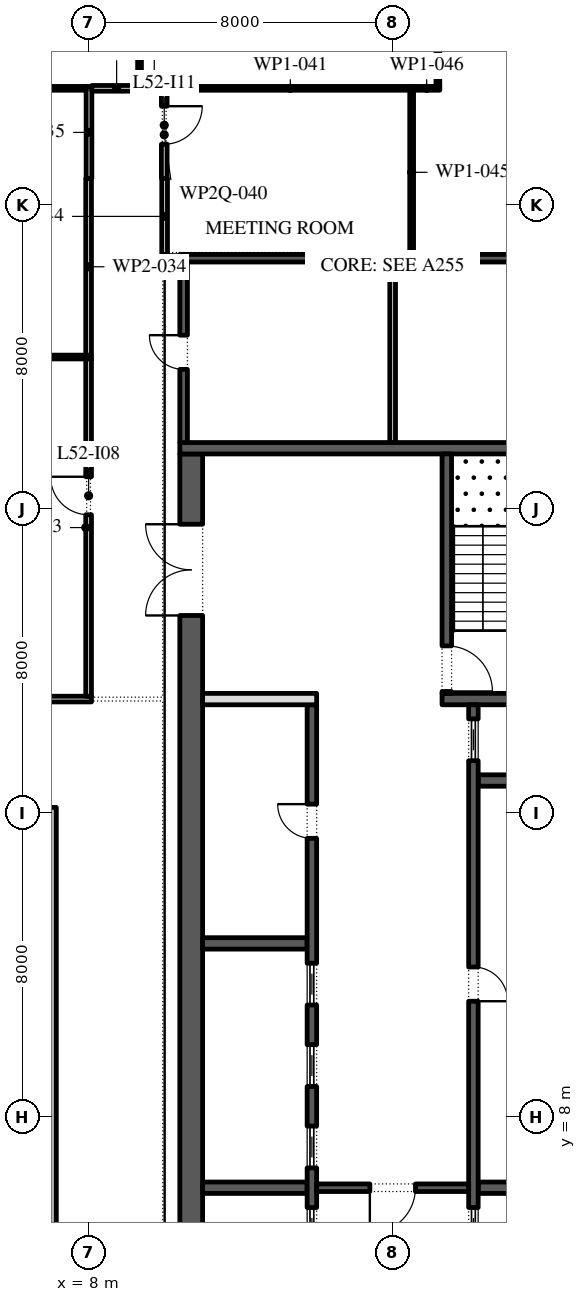
"""IFC4 building model, lengths in metres.
Left out: names, types, materials, properties, quantities, classifications, styles, units other than length and angle.
Written with IfcOpenShell. Run it as: python <this file> out.ifc"""

import sys

from ifc_helpers import new_model, si_unit, direction, frame, frame_2d, origin, place, context, subcontext, project, spatial, polyline, rectangle, outline, extrude, element, fill, save


model = new_model("IFC4")
c1 = context("Model", 3, precision=1e-05, world=origin(), true_north=direction((0.0, 1.0)))
c2 = subcontext(c1, "Body", "Model", "MODEL_VIEW")
j1 = project(units=[si_unit("LENGTHUNIT", "METRE"), si_unit("PLANEANGLEUNIT", "RADIAN")], contexts=[c1])
p1 = place(None, origin())
s1 = spatial("IfcSite", under=j1, at=p1, CompositionType="ELEMENT")
p2 = place(p1, origin())
s2 = spatial("IfcBuilding", under=s1, at=p2, CompositionType="ELEMENT")
p3 = place(p2, frame((0.0, 0.0, 243.0)))
s3 = spatial("IfcBuildingStorey", under=s2, at=p3, CompositionType="ELEMENT", Elevation=243.0)
p4 = place(p3, origin())
e1 = element("IfcWall", 1, at=p4, inside=s3, PredefinedType="STANDARD", context=c2, shape_type="SweptSolid", body=[
    extrude(outline(polyline([(-7.15, -2.15), (7.15, -2.15), (7.15, 16.15), (-7.15, 16.15), (-7.15, -2.15)]), holes=[polyline([(-7.0, -2.0), (-7.0, 16.0), (7.0, 16.0), (7.0, -2.0), (-7.0, -2.0)])]), origin(), (0.0, 0.0, 1.0), 4.0),
])
p5 = place(p3, frame((10.7, -2.45, 0.0), z_axis=(0.0, 0.0, 1.0), x_axis=(0.0, 1.0, 0.0)))
e2 = element("IfcWall", 2, at=p5, inside=s3, PredefinedType="SHEAR", context=c2, shape_type="SweptSolid", body=[
    extrude(rectangle(XDim=27.9, YDim=0.6, at=frame_2d((13.95, 0.0))), origin(), (0.0, 0.0, 1.0), 4.0),
])
p6 = place(p5, frame((23.65, 0.0, 0.0)))
e3 = element("IfcOpeningElement", 3, at=p6, cuts=e2, PredefinedType="OPENING", context=c2, shape_type="SweptSolid", body=[
    extrude(rectangle(XDim=2.4, YDim=2.1, at=frame_2d((1.2, 1.05))), frame((0.0, 0.31, 0.0), z_axis=(0.0, -1.0, 0.0), x_axis=(1.0, 0.0, 0.0)), (0.0, 0.0, 1.0), 0.62),
])
p7 = place(p5, frame((1.087, 0.0, 0.0)))
e4 = element("IfcOpeningElement", 4, at=p7, cuts=e2, PredefinedType="OPENING", context=c2, shape_type="SweptSolid", body=[
    extrude(rectangle(XDim=0.9, YDim=2.1, at=frame_2d((0.45, 1.05))), frame((0.0, 0.31, 0.0), z_axis=(0.0, -1.0, 0.0), x_axis=(1.0, 0.0, 0.0)), (0.0, 0.0, 1.0), 0.62),
])
p8 = place(p5, frame((4.262, 0.0, 0.0)))
e5 = element("IfcOpeningElement", 5, at=p8, cuts=e2, PredefinedType="OPENING", context=c2, shape_type="SweptSolid", body=[
    extrude(rectangle(XDim=1.0, YDim=2.1, at=frame_2d((0.5, 1.05))), frame((0.0, 0.31, 0.0), z_axis=(0.0, -1.0, 0.0), x_axis=(1.0, 0.0, 0.0)), (0.0, 0.0, 1.0), 0.62),
])
p9 = place(p3, frame((10.4, 25.6, 0.0), z_axis=(0.0, 0.0, 1.0), x_axis=(1.0, 0.0, 0.0)))
e6 = element("IfcWall", 6, at=p9, inside=s3, PredefinedType="SHEAR", context=c2, shape_type="SweptSolid", body=[
    extrude(rectangle(XDim=11.2, YDim=0.3, at=frame_2d((5.6, 0.0))), origin(), (0.0, 0.0, 1.0), 4.0),
])
p10 = place(p3, frame((17.3, 19.0, 0.0), z_axis=(0.0, 0.0, 1.0), x_axis=(1.0, 0.0, 0.0)))
e7 = element("IfcWall", 7, at=p10, inside=s3, PredefinedType="SHEAR", context=c2, shape_type="SweptSolid", body=[
    extrude(rectangle(XDim=3.7, YDim=0.3, at=frame_2d((1.85, 0.0))), origin(), (0.0, 0.0, 1.0), 4.0),
])
p11 = place(p3, frame((17.425, 19.15, 0.0), z_axis=(0.0, 0.0, 1.0), x_axis=(0.0, 1.0, 0.0)))
e8 = element("IfcWall", 8, at=p11, inside=s3, PredefinedType="SHEAR", context=c2, shape_type="SweptSolid", body=[
    extrude(rectangle(XDim=6.3, YDim=0.25, at=frame_2d((3.15, 0.0))), origin(), (0.0, 0.0, 1.0), 4.0),
])
p12 = place(p11, frame((0.05, 0.0, 0.0)))
e9 = element("IfcOpeningElement", 9, at=p12, cuts=e8, PredefinedType="OPENING", context=c2, shape_type="SweptSolid", body=[
    extrude(rectangle(XDim=1.2, YDim=2.1, at=frame_2d((0.6, 1.05))), frame((0.0, 0.135, 0.0), z_axis=(0.0, -1.0, 0.0), x_axis=(1.0, 0.0, 0.0)), (0.0, 0.0, 1.0), 0.27),
])
for number, where, z_axis, x_axis in (
    (10, (18.25, 6.143, 0.0), (0.0, 0.0, 1.0), (1.0, 0.0, 0.0)),
    (11, (18.25, 16.857, 0.0), (0.0, 0.0, 1.0), (1.0, 0.0, 0.0)),
):
    element("IfcWall", number, at=place(p3, frame(where, z_axis=z_axis, x_axis=x_axis)), inside=s3, PredefinedType="SHEAR", context=c2, shape_type="SweptSolid", body=[
        extrude(rectangle(XDim=2.75, YDim=0.3, at=frame_2d((1.375, 0.0))), origin(), (0.0, 0.0, 1.0), 4.0),
    ])
p13 = place(p3, frame((18.125, 4.15, 0.0), z_axis=(0.0, 0.0, 1.0), x_axis=(0.0, 1.0, 0.0)))
e12 = element("IfcWall", 12, at=p13, inside=s3, PredefinedType="SHEAR", context=c2, shape_type="SweptSolid", body=[
    extrude(rectangle(XDim=14.7, YDim=0.25, at=frame_2d((7.35, 0.0))), origin(), (0.0, 0.0, 1.0), 4.0),
])
p14 = place(p13, frame((6.9, 0.0, 0.0)))
e13 = element("IfcOpeningElement", 13, at=p14, cuts=e12, PredefinedType="OPENING", context=c2, shape_type="SweptSolid", body=[
    extrude(rectangle(XDim=0.9, YDim=2.1, at=frame_2d((0.45, 1.05))), frame((0.0, 0.135, 0.0), z_axis=(0.0, -1.0, 0.0), x_axis=(1.0, 0.0, 0.0)), (0.0, 0.0, 1.0), 0.27),
])
p15 = place(p13, frame((0.371, 0.0, 0.0)))
e14 = element("IfcOpeningElement", 14, at=p15, cuts=e12, PredefinedType="OPENING", context=c2, shape_type="SweptSolid", body=[
    extrude(rectangle(XDim=1.1, YDim=2.1, at=frame_2d((0.55, 1.05))), frame((0.0, 0.135, 0.0), z_axis=(0.0, -1.0, 0.0), x_axis=(1.0, 0.0, 0.0)), (0.0, 0.0, 1.0), 0.27),
])
p16 = place(p13, frame((13.229, 0.0, 0.0)))
e15 = element("IfcOpeningElement", 15, at=p16, cuts=e12, PredefinedType="OPENING", context=c2, shape_type="SweptSolid", body=[
    extrude(rectangle(XDim=1.1, YDim=2.1, at=frame_2d((0.55, 1.05))), frame((0.0, 0.135, 0.0), z_axis=(0.0, -1.0, 0.0), x_axis=(1.0, 0.0, 0.0)), (0.0, 0.0, 1.0), 0.27),
])
for number, where, z_axis, x_axis in (
    (16, (11.0, 6.143, 0.0), (0.0, 0.0, 1.0), (1.0, 0.0, 0.0)),
    (17, (11.0, 12.571, 0.0), (0.0, 0.0, 1.0), (1.0, 0.0, 0.0)),
):
    element("IfcWall", number, at=place(p3, frame(where, z_axis=z_axis, x_axis=x_axis)), inside=s3, PredefinedType="SHEAR", context=c2, shape_type="SweptSolid", body=[
        extrude(rectangle(XDim=2.75, YDim=0.3, at=frame_2d((1.375, 0.0))), origin(), (0.0, 0.0, 1.0), 4.0),
    ])
p17 = place(p3, frame((13.875, -2.45, 0.0), z_axis=(0.0, 0.0, 1.0), x_axis=(0.0, 1.0, 0.0)))
e18 = element("IfcWall", 18, at=p17, inside=s3, PredefinedType="SHEAR", context=c2, shape_type="SweptSolid", body=[
    extrude(rectangle(XDim=21.3, YDim=0.25, at=frame_2d((10.65, 0.0))), origin(), (0.0, 0.0, 1.0), 4.0),
])
p18 = place(p17, frame((17.786, 0.0, 0.0)))
e19 = element("IfcOpeningElement", 19, at=p18, cuts=e18, PredefinedType="OPENING", context=c2, shape_type="SweptSolid", body=[
    extrude(rectangle(XDim=0.9, YDim=2.1, at=frame_2d((0.45, 1.05))), frame((0.0, 0.135, 0.0), z_axis=(0.0, -1.0, 0.0), x_axis=(1.0, 0.0, 0.0)), (0.0, 0.0, 1.0), 0.27),
])
p19 = place(p17, frame((6.971, 0.0, 0.0)))
e20 = element("IfcOpeningElement", 20, at=p19, cuts=e18, PredefinedType="OPENING", context=c2, shape_type="SweptSolid", body=[
    extrude(rectangle(XDim=1.1, YDim=2.1, at=frame_2d((0.55, 1.05))), frame((0.0, 0.135, 0.0), z_axis=(0.0, -1.0, 0.0), x_axis=(1.0, 0.0, 0.0)), (0.0, 0.0, 1.0), 0.27),
])
p20 = place(p17, frame((9.114, 0.0, 0.0)))
e21 = element("IfcOpeningElement", 21, at=p20, cuts=e18, PredefinedType="OPENING", context=c2, shape_type="SweptSolid", body=[
    extrude(rectangle(XDim=1.1, YDim=2.1, at=frame_2d((0.55, 1.05))), frame((0.0, 0.135, 0.0), z_axis=(0.0, -1.0, 0.0), x_axis=(1.0, 0.0, 0.0)), (0.0, 0.0, 1.0), 0.27),
])
p21 = place(p17, frame((11.257, 0.0, 0.0)))
e22 = element("IfcOpeningElement", 22, at=p21, cuts=e18, PredefinedType="OPENING", context=c2, shape_type="SweptSolid", body=[
    extrude(rectangle(XDim=1.1, YDim=2.1, at=frame_2d((0.55, 1.05))), frame((0.0, 0.135, 0.0), z_axis=(0.0, -1.0, 0.0), x_axis=(1.0, 0.0, 0.0)), (0.0, 0.0, 1.0), 0.27),
])
p22 = place(p17, frame((13.4, 0.0, 0.0)))
e23 = element("IfcOpeningElement", 23, at=p22, cuts=e18, PredefinedType="OPENING", context=c2, shape_type="SweptSolid", body=[
    extrude(rectangle(XDim=1.1, YDim=2.1, at=frame_2d((0.55, 1.05))), frame((0.0, 0.135, 0.0), z_axis=(0.0, -1.0, 0.0), x_axis=(1.0, 0.0, 0.0)), (0.0, 0.0, 1.0), 0.27),
])
p23 = place(p3, frame((11.0, 19.0, 0.0), z_axis=(0.0, 0.0, 1.0), x_axis=(1.0, 0.0, 0.0)))
e24 = element("IfcWall", 24, at=p23, inside=s3, PredefinedType="PARTITIONING", context=c2, shape_type="SweptSolid", body=[
    extrude(rectangle(XDim=3.0, YDim=0.3, at=frame_2d((1.5, 0.0))), origin(), (0.0, 0.0, 1.0), 4.0),
])
p24 = place(p3, frame((14.0, 6.143, 0.0), z_axis=(0.0, 0.0, 1.0), x_axis=(1.0, 0.0, 0.0)))
e25 = element("IfcWall", 25, at=p24, inside=s3, PredefinedType="SHEAR", context=c2, shape_type="SweptSolid", body=[
    extrude(rectangle(XDim=4.0, YDim=0.2, at=frame_2d((2.0, 0.0))), origin(), (0.0, 0.0, 1.0), 4.0),
])
p25 = place(p24, frame((1.4, 0.0, 0.0)))
e26 = element("IfcOpeningElement", 26, at=p25, cuts=e25, PredefinedType="OPENING", context=c2, shape_type="SweptSolid", body=[
    extrude(rectangle(XDim=1.2, YDim=2.1, at=frame_2d((0.6, 1.05))), frame((0.0, 0.11, 0.0), z_axis=(0.0, -1.0, 0.0), x_axis=(1.0, 0.0, 0.0)), (0.0, 0.0, 1.0), 0.22),
])
p26 = place(p3, frame((10.5, 25.75, 0.0), z_axis=(0.0, 0.0, 1.0), x_axis=(0.0, 1.0, 0.0)))
e27 = element("IfcWall", 27, at=p26, inside=s3, PredefinedType="SHEAR", context=c2, shape_type="SweptSolid", body=[
    extrude(rectangle(XDim=4.75, YDim=0.2, at=frame_2d((2.375, 0.0))), origin(), (0.0, 0.0, 1.0), 4.0),
])
p27 = place(p26, frame((1.925, 0.0, 0.0)))
e28 = element("IfcOpeningElement", 28, at=p27, cuts=e27, PredefinedType="OPENING", context=c2, shape_type="SweptSolid", body=[
    extrude(rectangle(XDim=0.9, YDim=2.1, at=frame_2d((0.45, 1.05))), frame((0.0, 0.11, 0.0), z_axis=(0.0, -1.0, 0.0), x_axis=(1.0, 0.0, 0.0)), (0.0, 0.0, 1.0), 0.22),
])
p28 = place(p3, frame((10.4, 30.6, 0.0), z_axis=(0.0, 0.0, 1.0), x_axis=(1.0, 0.0, 0.0)))
e29 = element("IfcWall", 29, at=p28, inside=s3, PredefinedType="SHEAR", context=c2, shape_type="SweptSolid", body=[
    extrude(rectangle(XDim=11.2, YDim=0.2, at=frame_2d((5.6, 0.0))), origin(), (0.0, 0.0, 1.0), 4.0),
])
p29 = place(p3, frame((16.0, 25.75, 0.0), z_axis=(0.0, 0.0, 1.0), x_axis=(0.0, 1.0, 0.0)))
e30 = element("IfcWall", 30, at=p29, inside=s3, PredefinedType="PARTITIONING", context=c2, shape_type="SweptSolid", body=[
    extrude(rectangle(XDim=4.75, YDim=0.15, at=frame_2d((2.375, 0.0))), origin(), (0.0, 0.0, 1.0), 4.0),
])
p30 = place(p3, frame((1.025, 19.0, 0.0), z_axis=(0.0, 0.0, 1.0), x_axis=(1.0, 0.0, 0.0)))
e31 = element("IfcWall", 31, at=p30, inside=s3, PredefinedType="PARTITIONING", context=c2, shape_type="SweptSolid", body=[
    extrude(rectangle(XDim=7.05, YDim=0.15, at=frame_2d((3.525, 0.0))), origin(), (0.0, 0.0, 1.0), 4.0),
])
p31 = place(p3, frame((1.175, 28.0, 0.0), z_axis=(0.0, 0.0, 1.0), x_axis=(1.0, 0.0, 0.0)))
e32 = element("IfcWall", 32, at=p31, inside=s3, PredefinedType="PARTITIONING", context=c2, shape_type="SweptSolid", body=[
    extrude(rectangle(XDim=6.9, YDim=0.1, at=frame_2d((3.45, 0.0))), origin(), (0.0, 0.0, 1.0), 4.0),
])
p32 = place(p3, frame((8.0, 19.075, 0.0), z_axis=(0.0, 0.0, 1.0), x_axis=(0.0, 1.0, 0.0)))
e33 = element("IfcWall", 33, at=p32, inside=s3, PredefinedType="PARTITIONING", context=c2, shape_type="SweptSolid", body=[
    extrude(rectangle(XDim=8.875, YDim=0.15, at=frame_2d((4.438, 0.0))), origin(), (0.0, 0.0, 1.0), 4.0),
])
p33 = place(p32, frame((4.775, 0.0, 0.0)))
e34 = element("IfcOpeningElement", 34, at=p33, cuts=e33, PredefinedType="OPENING", context=c2, shape_type="SweptSolid", body=[
    extrude(rectangle(XDim=1.0, YDim=2.1, at=frame_2d((0.5, 1.05))), frame((0.0, 0.085, 0.0), z_axis=(0.0, -1.0, 0.0), x_axis=(1.0, 0.0, 0.0)), (0.0, 0.0, 1.0), 0.17),
])
p34 = place(p3, frame((8.0, 28.05, 0.0), z_axis=(0.0, 0.0, 1.0), x_axis=(0.0, 1.0, 0.0)))
e35 = element("IfcWall", 35, at=p34, inside=s3, PredefinedType="PARTITIONING", context=c2, shape_type="SweptSolid", body=[
    extrude(rectangle(XDim=4.65, YDim=0.15, at=frame_2d((2.325, 0.0))), origin(), (0.0, 0.0, 1.0), 4.0),
])
p35 = place(p3, frame((8.01, 32.7, 0.0), z_axis=(0.0, 0.0, 1.0), x_axis=(0.0, 1.0, 0.0)))
e36 = element("IfcWall", 36, at=p35, inside=s3, PredefinedType="PARTITIONING", context=c2, shape_type="SweptSolid", body=[
    extrude(rectangle(XDim=2.42, YDim=0.15, at=frame_2d((1.21, 0.0))), origin(), (0.0, 0.0, 1.0), 4.0),
])
p36 = place(p3, frame((7.935, 35.07, 0.0), z_axis=(0.0, 0.0, 1.0), x_axis=(-1.0, 0.0, 0.0)))
e37 = element("IfcWall", 37, at=p36, inside=s3, PredefinedType="PARTITIONING", context=c2, shape_type="SweptSolid", body=[
    extrude(rectangle(XDim=6.76, YDim=0.1, at=frame_2d((3.38, 0.0))), origin(), (0.0, 0.0, 1.0), 4.0),
])
p37 = place(p3, frame((8.085, 35.07, 0.0), z_axis=(0.0, 0.0, 1.0), x_axis=(1.0, 0.0, 0.0)))
e38 = element("IfcWall", 38, at=p37, inside=s3, PredefinedType="PARTITIONING", context=c2, shape_type="SweptSolid", body=[
    extrude(rectangle(XDim=1.305, YDim=0.15, at=frame_2d((0.652, 0.0))), origin(), (0.0, 0.0, 1.0), 4.0),
])
p38 = place(p3, frame((9.39, 35.07, 0.0), z_axis=(0.0, 0.0, 1.0), x_axis=(1.0, 0.0, 0.0)))
e39 = element("IfcWall", 39, at=p38, inside=s3, PredefinedType="PARTITIONING", context=c2, shape_type="SweptSolid", body=[
    extrude(rectangle(XDim=0.675, YDim=0.15, at=frame_2d((0.337, 0.0))), origin(), (0.0, 0.0, 1.0), 4.0),
])
p39 = place(p3, frame((9.34, 45.368, 0.0), z_axis=(0.0, 0.0, 1.0), x_axis=(0.0, -1.0, 0.0)))
e40 = element("IfcWall", 40, at=p39, inside=s3, PredefinedType="PARTITIONING", context=c2, shape_type="SweptSolid", body=[
    extrude(rectangle(XDim=10.223, YDim=0.1, at=frame_2d((5.111, 0.0))), origin(), (0.0, 0.0, 1.0), 4.0),
])
p40 = place(p39, frame((6.698, 0.0, 0.0)))
e41 = element("IfcOpeningElement", 41, at=p40, cuts=e40, PredefinedType="OPENING", context=c2, shape_type="SweptSolid", body=[
    extrude(rectangle(XDim=0.9, YDim=2.1, at=frame_2d((0.45, 1.05))), frame((0.0, 0.06, 0.0), z_axis=(0.0, -1.0, 0.0), x_axis=(1.0, 0.0, 0.0)), (0.0, 0.0, 1.0), 0.12),
])
p41 = place(p3, frame((9.99, 34.995, 0.0), z_axis=(0.0, 0.0, 1.0), x_axis=(0.0, -1.0, 0.0)))
e42 = element("IfcWall", 42, at=p41, inside=s3, PredefinedType="PARTITIONING", context=c2, shape_type="SweptSolid", body=[
    extrude(rectangle(XDim=2.295, YDim=0.15, at=frame_2d((1.147, 0.0))), origin(), (0.0, 0.0, 1.0), 3.154),
])
p42 = place(p41, frame((0.395, 0.0, 0.0)))
e43 = element("IfcOpeningElement", 43, at=p42, cuts=e42, PredefinedType="OPENING", context=c2, shape_type="SweptSolid", body=[
    extrude(rectangle(XDim=1.0, YDim=2.1, at=frame_2d((0.5, 1.05))), frame((0.0, 0.085, 0.0), z_axis=(0.0, -1.0, 0.0), x_axis=(1.0, 0.0, 0.0)), (0.0, 0.0, 1.0), 0.17),
])
p43 = place(p3, frame((10.065, 35.07, 0.0), z_axis=(0.0, 0.0, 1.0), x_axis=(1.0, 0.0, 0.0)))
e44 = element("IfcWall", 44, at=p43, inside=s3, PredefinedType="PARTITIONING", context=c2, shape_type="SweptSolid", body=[
    extrude(rectangle(XDim=6.485, YDim=0.1, at=frame_2d((3.243, 0.0))), origin(), (0.0, 0.0, 1.0), 4.0),
])
p44 = place(p3, frame((10.0, 32.7, 0.0), z_axis=(0.0, 0.0, 1.0), x_axis=(0.0, -1.0, 0.0)))
e45 = element("IfcWall", 45, at=p44, inside=s3, PredefinedType="PARTITIONING", context=c2, shape_type="SweptSolid", body=[
    extrude(rectangle(XDim=2.0, YDim=0.15, at=frame_2d((1.0, 0.0))), origin(), (0.0, 0.0, 1.0), 3.154),
])
p45 = place(p3, frame((16.5, 35.02, 0.0), z_axis=(0.0, 0.0, 1.0), x_axis=(0.0, -1.0, 0.0)))
e46 = element("IfcWall", 46, at=p45, inside=s3, PredefinedType="PARTITIONING", context=c2, shape_type="SweptSolid", body=[
    extrude(rectangle(XDim=4.32, YDim=0.1, at=frame_2d((2.16, 0.0))), origin(), (0.0, 0.0, 1.0), 4.0),
])
p46 = place(p3, frame((17.24, 35.07, 0.0), z_axis=(0.0, 0.0, 1.0), x_axis=(-1.0, 0.0, 0.0)))
e47 = element("IfcWall", 47, at=p46, inside=s3, PredefinedType="PARTITIONING", context=c2, shape_type="SweptSolid", body=[
    extrude(rectangle(XDim=0.69, YDim=0.1, at=frame_2d((0.345, 0.0))), origin(), (0.0, 0.0, 1.0), 4.0),
])
p47 = place(p3, frame((17.19, 43.556, 0.0), z_axis=(0.0, 0.0, 1.0), x_axis=(0.0, -1.0, 0.0)))
e48 = element("IfcWall", 48, at=p47, inside=s3, PredefinedType="PARTITIONING", context=c2, shape_type="SweptSolid", body=[
    extrude(rectangle(XDim=8.436, YDim=0.1, at=frame_2d((4.218, 0.0))), origin(), (0.0, 0.0, 1.0), 4.0),
])
p48 = place(p14, frame((0.9, -0.2, 0.0), z_axis=(0.0, 0.0, 1.0), x_axis=(-1.0, 0.0, 0.0)))
e49 = element("IfcDoor", 49, at=p48, inside=s3, OperationType="SINGLE_SWING_LEFT", PredefinedType="DOOR", context=c2, shape_type="SweptSolid", body=[
    extrude(rectangle(XDim=0.9, YDim=2.1, at=frame_2d((0.45, 1.05))), frame((0.0, -0.075, 0.0), z_axis=(0.0, -1.0, 0.0), x_axis=(1.0, 0.0, 0.0)), (0.0, 0.0, 1.0), 0.05),
])
fill(e13, e49)
p49 = place(p15, origin())
e50 = element("IfcDoor", 50, at=p49, inside=s3, OperationType="SLIDING_TO_LEFT", PredefinedType="DOOR", context=c2, shape_type="SweptSolid", body=[
    extrude(rectangle(XDim=1.1, YDim=2.1, at=frame_2d((0.55, 1.05))), frame((0.0, 0.025, 0.0), z_axis=(0.0, -1.0, 0.0), x_axis=(1.0, 0.0, 0.0)), (0.0, 0.0, 1.0), 0.05),
])
fill(e14, e50)
p50 = place(p16, origin())
e51 = element("IfcDoor", 51, at=p50, inside=s3, OperationType="SLIDING_TO_LEFT", PredefinedType="DOOR", context=c2, shape_type="SweptSolid", body=[
    extrude(rectangle(XDim=1.1, YDim=2.1, at=frame_2d((0.55, 1.05))), frame((0.0, 0.025, 0.0), z_axis=(0.0, -1.0, 0.0), x_axis=(1.0, 0.0, 0.0)), (0.0, 0.0, 1.0), 0.05),
])
fill(e15, e51)
p51 = place(p18, origin())
e52 = element("IfcDoor", 52, at=p51, inside=s3, OperationType="SINGLE_SWING_LEFT", PredefinedType="DOOR", context=c2, shape_type="SweptSolid", body=[
    extrude(rectangle(XDim=0.9, YDim=2.1, at=frame_2d((0.45, 1.05))), frame((0.0, 0.125, 0.0), z_axis=(0.0, -1.0, 0.0), x_axis=(1.0, 0.0, 0.0)), (0.0, 0.0, 1.0), 0.05),
])
fill(e19, e52)
p52 = place(p19, origin())
e53 = element("IfcDoor", 53, at=p52, inside=s3, OperationType="SLIDING_TO_LEFT", PredefinedType="DOOR", context=c2, shape_type="SweptSolid", body=[
    extrude(rectangle(XDim=1.1, YDim=2.1, at=frame_2d((0.55, 1.05))), frame((0.0, 0.025, 0.0), z_axis=(0.0, -1.0, 0.0), x_axis=(1.0, 0.0, 0.0)), (0.0, 0.0, 1.0), 0.05),
])
fill(e20, e53)
p53 = place(p20, origin())
e54 = element("IfcDoor", 54, at=p53, inside=s3, OperationType="SLIDING_TO_LEFT", PredefinedType="DOOR", context=c2, shape_type="SweptSolid", body=[
    extrude(rectangle(XDim=1.1, YDim=2.1, at=frame_2d((0.55, 1.05))), frame((0.0, 0.025, 0.0), z_axis=(0.0, -1.0, 0.0), x_axis=(1.0, 0.0, 0.0)), (0.0, 0.0, 1.0), 0.05),
])
fill(e21, e54)
p54 = place(p21, origin())
e55 = element("IfcDoor", 55, at=p54, inside=s3, OperationType="SLIDING_TO_LEFT", PredefinedType="DOOR", context=c2, shape_type="SweptSolid", body=[
    extrude(rectangle(XDim=1.1, YDim=2.1, at=frame_2d((0.55, 1.05))), frame((0.0, 0.025, 0.0), z_axis=(0.0, -1.0, 0.0), x_axis=(1.0, 0.0, 0.0)), (0.0, 0.0, 1.0), 0.05),
])
fill(e22, e55)
p55 = place(p22, origin())
e56 = element("IfcDoor", 56, at=p55, inside=s3, OperationType="SLIDING_TO_LEFT", PredefinedType="DOOR", context=c2, shape_type="SweptSolid", body=[
    extrude(rectangle(XDim=1.1, YDim=2.1, at=frame_2d((0.55, 1.05))), frame((0.0, 0.025, 0.0), z_axis=(0.0, -1.0, 0.0), x_axis=(1.0, 0.0, 0.0)), (0.0, 0.0, 1.0), 0.05),
])
fill(e23, e56)
p56 = place(p25, frame((1.2, 0.0, 0.0), z_axis=(0.0, 0.0, 1.0), x_axis=(-1.0, 0.0, 0.0)))
e57 = element("IfcDoor", 57, at=p56, inside=s3, OperationType="SINGLE_SWING_LEFT", PredefinedType="DOOR", context=c2, shape_type="SweptSolid", body=[
    extrude(rectangle(XDim=1.2, YDim=2.1, at=frame_2d((0.6, 1.05))), frame((0.0, 0.025, 0.0), z_axis=(0.0, -1.0, 0.0), x_axis=(1.0, 0.0, 0.0)), (0.0, 0.0, 1.0), 0.05),
])
fill(e26, e57)
p57 = place(p6, origin())
e58 = element("IfcDoor", 58, at=p57, inside=s3, OperationType="DOUBLE_DOOR_SINGLE_SWING", PredefinedType="DOOR", context=c2, shape_type="SweptSolid", body=[
    extrude(rectangle(XDim=2.4, YDim=2.1, at=frame_2d((1.2, 1.05))), frame((0.0, 0.025, 0.0), z_axis=(0.0, -1.0, 0.0), x_axis=(1.0, 0.0, 0.0)), (0.0, 0.0, 1.0), 0.05),
])
fill(e3, e58)
p58 = place(p12, frame((1.2, 0.0, 0.0), z_axis=(0.0, 0.0, 1.0), x_axis=(-1.0, 0.0, 0.0)))
e59 = element("IfcDoor", 59, at=p58, inside=s3, OperationType="SINGLE_SWING_LEFT", PredefinedType="DOOR", context=c2, shape_type="SweptSolid", body=[
    extrude(rectangle(XDim=1.2, YDim=2.1, at=frame_2d((0.6, 1.05))), frame((0.0, 0.025, 0.0), z_axis=(0.0, -1.0, 0.0), x_axis=(1.0, 0.0, 0.0)), (0.0, 0.0, 1.0), 0.05),
])
fill(e9, e59)
p59 = place(p27, origin())
e60 = element("IfcDoor", 60, at=p59, inside=s3, OperationType="SINGLE_SWING_LEFT", PredefinedType="DOOR", context=c2, shape_type="SweptSolid", body=[
    extrude(rectangle(XDim=0.9, YDim=2.1, at=frame_2d((0.45, 1.05))), frame((0.0, -0.05, 0.0), z_axis=(0.0, -1.0, 0.0), x_axis=(1.0, 0.0, 0.0)), (0.0, 0.0, 1.0), 0.05),
])
fill(e28, e60)
p60 = place(p33, origin())
e61 = element("IfcDoor", 61, at=p60, inside=s3, OperationType="SINGLE_SWING_LEFT", PredefinedType="DOOR", context=c2, shape_type="SweptSolid", body=[
    extrude(rectangle(XDim=1.0, YDim=2.1, at=frame_2d((0.5, 1.05))), frame((0.0, 0.025, 0.0), z_axis=(0.0, -1.0, 0.0), x_axis=(1.0, 0.0, 0.0)), (0.0, 0.0, 1.0), 0.05),
])
fill(e34, e61)
p61 = place(p42, origin())
e62 = element("IfcDoor", 62, at=p61, inside=s3, OperationType="SINGLE_SWING_RIGHT", PredefinedType="DOOR", context=c2, shape_type="SweptSolid", body=[
    extrude(rectangle(XDim=1.0, YDim=2.1, at=frame_2d((0.5, 1.05))), frame((0.0, 0.025, 0.0), z_axis=(0.0, -1.0, 0.0), x_axis=(1.0, 0.0, 0.0)), (0.0, 0.0, 1.0), 0.05),
])
fill(e43, e62)
save(model, sys.argv[1])
